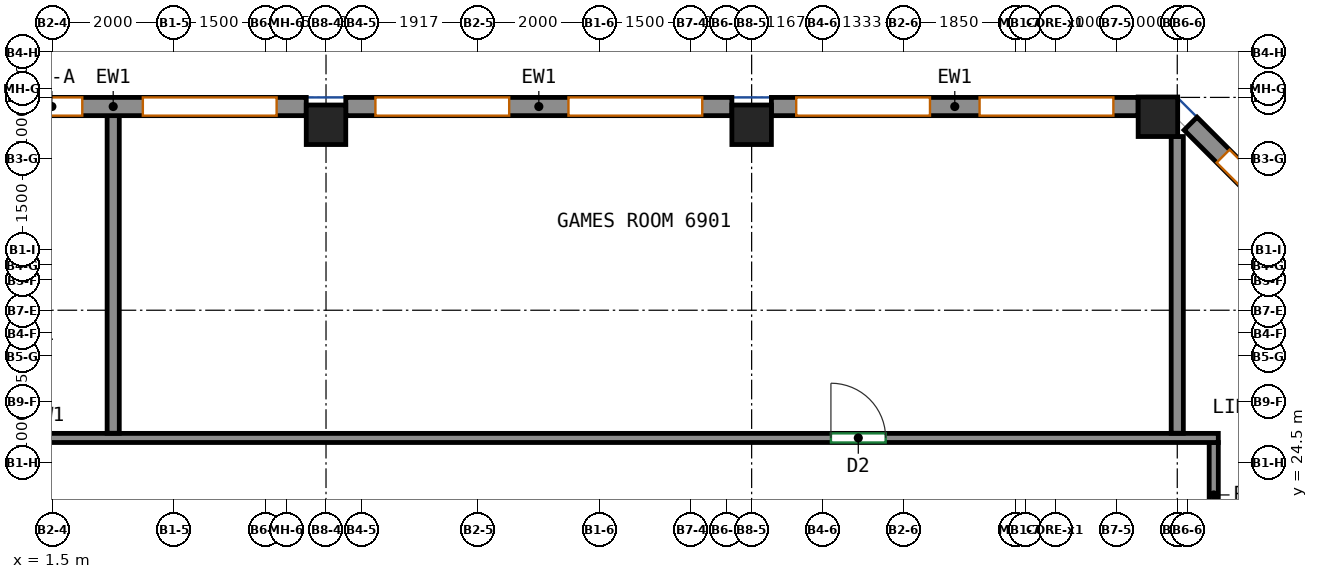
"""IFC4 building model, lengths in metres.
Left out: names, types, materials, properties, quantities, classifications, styles, units other than length and angle.
Written with IfcOpenShell. Run it as: python <this file> out.ifc"""

import sys

from ifc_helpers import new_model, si_unit, direction, frame, frame_2d, origin, origin_2d, place, context, subcontext, project, spatial, rectangle, extrude, source, transform, mapped, element, fill, save


model = new_model("IFC4")
c1 = context("Model", 3, precision=1e-05, world=origin(), true_north=direction((0.0, 1.0)))
c2 = subcontext(c1, "Body", "Model", "MODEL_VIEW")
j1 = project(units=[si_unit("LENGTHUNIT", "METRE"), si_unit("PLANEANGLEUNIT", "RADIAN")], contexts=[c1])
p1 = place(None, origin())
s1 = spatial("IfcSite", under=j1, at=p1, CompositionType="ELEMENT")
p2 = place(p1, origin())
s2 = spatial("IfcBuilding", under=s1, at=p2, CompositionType="ELEMENT")
p3 = place(p2, frame((0.0, 0.0, 280.6)))
s3 = spatial("IfcBuildingStorey", under=s2, at=p3, CompositionType="ELEMENT", Elevation=280.6)
m1 = source(origin(), c2, "Body", "SweptSolid", [
    extrude(rectangle(XDim=0.65, YDim=0.65, at=origin_2d()), origin(), (0.0, 0.0, 1.0), 3.12),
])
for number, where, z_axis, x_axis in (
    (1, (6.0, 30.05, 0.0), (0.0, 0.0, 1.0), (1.0, 0.0, 0.0)),
    (2, (13.0, 30.05, 0.0), (0.0, 0.0, 1.0), (1.0, 0.0, 0.0)),
    (3, (19.682, 30.182, 0.0), (0.0, 0.0, 1.0), (1.0, 0.0, 0.0)),
):
    element("IfcColumn", number, at=place(p3, frame(where, z_axis=z_axis, x_axis=x_axis)), inside=s3, PredefinedType="COLUMN", context=c2, shape_type="MappedRepresentation", body=[
        mapped(m1, transform((0.0, 0.0, 0.0))),
    ])
m2 = source(origin(), c2, "Body", "SweptSolid", [
    extrude(rectangle(XDim=3.712, YDim=0.3, at=frame_2d((1.856, 0.0))), origin(), (0.0, 0.0, 1.0), 3.12),
])
p4 = place(p3, frame((22.844, 27.444, 0.0), z_axis=(0.0, 0.0, 1.0), x_axis=(-0.707106781187, 0.707106781187, 0.0)))
e4 = element("IfcWall", 4, at=p4, inside=s3, PredefinedType="SOLIDWALL", context=c2, shape_type="MappedRepresentation", body=[
    mapped(m2, transform((0.0, 0.0, 0.0))),
])
p5 = place(p4, frame((0.756, 0.0, 0.8)))
e5 = element("IfcOpeningElement", 5, at=p5, cuts=e4, PredefinedType="OPENING", context=c2, shape_type="SweptSolid", body=[
    extrude(rectangle(XDim=2.2, YDim=2.05, at=frame_2d((1.1, 1.025))), frame((0.0, 0.16, 0.0), z_axis=(0.0, -1.0, 0.0), x_axis=(1.0, 0.0, 0.0)), (0.0, 0.0, 1.0), 0.32),
])
m3 = source(origin(), c2, "Body", "SweptSolid", [
    extrude(rectangle(XDim=6.032, YDim=0.3, at=frame_2d((3.016, 0.0))), origin(), (0.0, 0.0, 1.0), 3.12),
])
p6 = place(p3, frame((19.357, 30.35, 0.0), z_axis=(0.0, 0.0, 1.0), x_axis=(-1.0, 0.0, 0.0)))
e6 = element("IfcWall", 6, at=p6, inside=s3, PredefinedType="SOLIDWALL", context=c2, shape_type="MappedRepresentation", body=[
    mapped(m3, transform((0.0, 0.0, 0.0))),
])
p7 = place(p6, frame((0.408, 0.0, 0.8)))
e7 = element("IfcOpeningElement", 7, at=p7, cuts=e6, PredefinedType="OPENING", context=c2, shape_type="SweptSolid", body=[
    extrude(rectangle(XDim=2.2, YDim=2.05, at=frame_2d((1.1, 1.025))), frame((0.0, 0.16, 0.0), z_axis=(0.0, -1.0, 0.0), x_axis=(1.0, 0.0, 0.0)), (0.0, 0.0, 1.0), 0.32),
])
p8 = place(p6, frame((3.424, 0.0, 0.8)))
e8 = element("IfcOpeningElement", 8, at=p8, cuts=e6, PredefinedType="OPENING", context=c2, shape_type="SweptSolid", body=[
    extrude(rectangle(XDim=2.2, YDim=2.05, at=frame_2d((1.1, 1.025))), frame((0.0, 0.16, 0.0), z_axis=(0.0, -1.0, 0.0), x_axis=(1.0, 0.0, 0.0)), (0.0, 0.0, 1.0), 0.32),
])
m4 = source(origin(), c2, "Body", "SweptSolid", [
    extrude(rectangle(XDim=6.35, YDim=0.3, at=frame_2d((3.175, 0.0))), origin(), (0.0, 0.0, 1.0), 3.12),
])
p9 = place(p3, frame((12.675, 30.35, 0.0), z_axis=(0.0, 0.0, 1.0), x_axis=(-1.0, 0.0, 0.0)))
e9 = element("IfcWall", 9, at=p9, inside=s3, PredefinedType="SOLIDWALL", context=c2, shape_type="MappedRepresentation", body=[
    mapped(m4, transform((0.0, 0.0, 0.0))),
])
p10 = place(p9, frame((0.488, 0.0, 0.8)))
e10 = element("IfcOpeningElement", 10, at=p10, cuts=e9, PredefinedType="OPENING", context=c2, shape_type="SweptSolid", body=[
    extrude(rectangle(XDim=2.2, YDim=2.05, at=frame_2d((1.1, 1.025))), frame((0.0, 0.16, 0.0), z_axis=(0.0, -1.0, 0.0), x_axis=(1.0, 0.0, 0.0)), (0.0, 0.0, 1.0), 0.32),
])
p11 = place(p9, frame((3.663, 0.0, 0.8)))
e11 = element("IfcOpeningElement", 11, at=p11, cuts=e9, PredefinedType="OPENING", context=c2, shape_type="SweptSolid", body=[
    extrude(rectangle(XDim=2.2, YDim=2.05, at=frame_2d((1.1, 1.025))), frame((0.0, 0.16, 0.0), z_axis=(0.0, -1.0, 0.0), x_axis=(1.0, 0.0, 0.0)), (0.0, 0.0, 1.0), 0.32),
])
p12 = place(p3, frame((5.675, 30.35, 0.0), z_axis=(0.0, 0.0, 1.0), x_axis=(-1.0, 0.0, 0.0)))
e12 = element("IfcWall", 12, at=p12, inside=s3, PredefinedType="SOLIDWALL", context=c2, shape_type="MappedRepresentation", body=[
    mapped(m4, transform((0.0, 0.0, 0.0))),
])
p13 = place(p12, frame((0.488, 0.0, 0.8)))
e13 = element("IfcOpeningElement", 13, at=p13, cuts=e12, PredefinedType="OPENING", context=c2, shape_type="SweptSolid", body=[
    extrude(rectangle(XDim=2.2, YDim=2.05, at=frame_2d((1.1, 1.025))), frame((0.0, 0.16, 0.0), z_axis=(0.0, -1.0, 0.0), x_axis=(1.0, 0.0, 0.0)), (0.0, 0.0, 1.0), 0.32),
])
p14 = place(p12, frame((3.684, 0.0, 0.8)))
e14 = element("IfcOpeningElement", 14, at=p14, cuts=e12, PredefinedType="OPENING", context=c2, shape_type="SweptSolid", body=[
    extrude(rectangle(XDim=1.0, YDim=2.05, at=frame_2d((0.5, 1.025))), frame((0.0, 0.16, 0.0), z_axis=(0.0, -1.0, 0.0), x_axis=(1.0, 0.0, 0.0)), (0.0, 0.0, 1.0), 0.32),
])
p15 = place(p12, frame((5.009, 0.0, 0.8)))
e15 = element("IfcOpeningElement", 15, at=p15, cuts=e12, PredefinedType="OPENING", context=c2, shape_type="SweptSolid", body=[
    extrude(rectangle(XDim=0.85, YDim=2.05, at=frame_2d((0.425, 1.025))), frame((0.0, 0.16, 0.0), z_axis=(0.0, -1.0, 0.0), x_axis=(1.0, 0.0, 0.0)), (0.0, 0.0, 1.0), 0.32),
])
p16 = place(p3, frame((20.6, 23.1, 0.0), z_axis=(0.0, 0.0, 1.0), x_axis=(0.0, 1.0, 0.0)))
e16 = element("IfcWall", 16, at=p16, inside=s3, PredefinedType="PARTITIONING", context=c2, shape_type="SweptSolid", body=[
    extrude(rectangle(XDim=1.725, YDim=0.15, at=frame_2d((0.862, 0.0))), origin(), (0.0, 0.0, 1.0), 3.12),
])
p17 = place(p3, frame((-19.075, 24.9, 0.0), z_axis=(0.0, 0.0, 1.0), x_axis=(1.0, 0.0, 0.0)))
e17 = element("IfcWall", 17, at=p17, inside=s3, PredefinedType="PARTITIONING", context=c2, shape_type="SweptSolid", body=[
    extrude(rectangle(XDim=39.75, YDim=0.15, at=frame_2d((19.875, 0.0))), origin(), (0.0, 0.0, 1.0), 3.12),
])
p18 = place(p17, frame((11.365, 0.0, 0.0)))
e18 = element("IfcOpeningElement", 18, at=p18, cuts=e17, PredefinedType="OPENING", context=c2, shape_type="SweptSolid", body=[
    extrude(rectangle(XDim=1.0, YDim=2.1, at=frame_2d((0.5, 1.05))), frame((0.0, 0.085, 0.0), z_axis=(0.0, -1.0, 0.0), x_axis=(1.0, 0.0, 0.0)), (0.0, 0.0, 1.0), 0.17),
])
p19 = place(p17, frame((33.379, 0.0, 0.0)))
e19 = element("IfcOpeningElement", 19, at=p19, cuts=e17, PredefinedType="OPENING", context=c2, shape_type="SweptSolid", body=[
    extrude(rectangle(XDim=0.9, YDim=2.1, at=frame_2d((0.45, 1.05))), frame((0.0, 0.085, 0.0), z_axis=(0.0, -1.0, 0.0), x_axis=(1.0, 0.0, 0.0)), (0.0, 0.0, 1.0), 0.17),
])
p20 = place(p3, frame((20.0, 29.857, 0.0), z_axis=(0.0, 0.0, 1.0), x_axis=(0.0, -1.0, 0.0)))
e20 = element("IfcWall", 20, at=p20, inside=s3, PredefinedType="PARTITIONING", context=c2, shape_type="SweptSolid", body=[
    extrude(rectangle(XDim=4.88, YDim=0.2, at=frame_2d((2.44, 0.0))), origin(), (0.0, 0.0, 1.0), 3.12),
])
p21 = place(p3, frame((2.5, 30.25, 0.0), z_axis=(0.0, 0.0, 1.0), x_axis=(0.0, -1.0, 0.0)))
e21 = element("IfcWall", 21, at=p21, inside=s3, PredefinedType="PARTITIONING", context=c2, shape_type="SweptSolid", body=[
    extrude(rectangle(XDim=5.273, YDim=0.2, at=frame_2d((2.636, 0.0))), origin(), (0.0, 0.0, 1.0), 3.12),
])
p22 = place(p5, origin())
e22 = element("IfcWindow", 22, at=p22, inside=s3, PartitioningType="SINGLE_PANEL", PredefinedType="WINDOW", context=c2, shape_type="SweptSolid", body=[
    extrude(rectangle(XDim=2.2, YDim=2.05, at=frame_2d((1.1, 1.025))), frame((0.0, 0.03, 0.0), z_axis=(0.0, -1.0, 0.0), x_axis=(1.0, 0.0, 0.0)), (0.0, 0.0, 1.0), 0.06),
])
fill(e5, e22)
p23 = place(p7, origin())
e23 = element("IfcWindow", 23, at=p23, inside=s3, PartitioningType="SINGLE_PANEL", PredefinedType="WINDOW", context=c2, shape_type="SweptSolid", body=[
    extrude(rectangle(XDim=2.2, YDim=2.05, at=frame_2d((1.1, 1.025))), frame((0.0, 0.03, 0.0), z_axis=(0.0, -1.0, 0.0), x_axis=(1.0, 0.0, 0.0)), (0.0, 0.0, 1.0), 0.06),
])
fill(e7, e23)
p24 = place(p8, origin())
e24 = element("IfcWindow", 24, at=p24, inside=s3, PartitioningType="SINGLE_PANEL", PredefinedType="WINDOW", context=c2, shape_type="SweptSolid", body=[
    extrude(rectangle(XDim=2.2, YDim=2.05, at=frame_2d((1.1, 1.025))), frame((0.0, 0.03, 0.0), z_axis=(0.0, -1.0, 0.0), x_axis=(1.0, 0.0, 0.0)), (0.0, 0.0, 1.0), 0.06),
])
fill(e8, e24)
p25 = place(p10, origin())
e25 = element("IfcWindow", 25, at=p25, inside=s3, PartitioningType="SINGLE_PANEL", PredefinedType="WINDOW", context=c2, shape_type="SweptSolid", body=[
    extrude(rectangle(XDim=2.2, YDim=2.05, at=frame_2d((1.1, 1.025))), frame((0.0, 0.03, 0.0), z_axis=(0.0, -1.0, 0.0), x_axis=(1.0, 0.0, 0.0)), (0.0, 0.0, 1.0), 0.06),
])
fill(e10, e25)
p26 = place(p11, origin())
e26 = element("IfcWindow", 26, at=p26, inside=s3, PartitioningType="SINGLE_PANEL", PredefinedType="WINDOW", context=c2, shape_type="SweptSolid", body=[
    extrude(rectangle(XDim=2.2, YDim=2.05, at=frame_2d((1.1, 1.025))), frame((0.0, 0.03, 0.0), z_axis=(0.0, -1.0, 0.0), x_axis=(1.0, 0.0, 0.0)), (0.0, 0.0, 1.0), 0.06),
])
fill(e11, e26)
p27 = place(p13, origin())
e27 = element("IfcWindow", 27, at=p27, inside=s3, PartitioningType="SINGLE_PANEL", PredefinedType="WINDOW", context=c2, shape_type="SweptSolid", body=[
    extrude(rectangle(XDim=2.2, YDim=2.05, at=frame_2d((1.1, 1.025))), frame((0.0, 0.03, 0.0), z_axis=(0.0, -1.0, 0.0), x_axis=(1.0, 0.0, 0.0)), (0.0, 0.0, 1.0), 0.06),
])
fill(e13, e27)
p28 = place(p14, origin())
e28 = element("IfcWindow", 28, at=p28, inside=s3, PartitioningType="SINGLE_PANEL", PredefinedType="WINDOW", context=c2, shape_type="SweptSolid", body=[
    extrude(rectangle(XDim=1.0, YDim=2.05, at=frame_2d((0.5, 1.025))), frame((0.0, 0.03, 0.0), z_axis=(0.0, -1.0, 0.0), x_axis=(1.0, 0.0, 0.0)), (0.0, 0.0, 1.0), 0.06),
])
fill(e14, e28)
p29 = place(p19, origin())
e29 = element("IfcDoor", 29, at=p29, inside=s3, OperationType="SINGLE_SWING_LEFT", PredefinedType="DOOR", context=c2, shape_type="SweptSolid", body=[
    extrude(rectangle(XDim=0.9, YDim=2.1, at=frame_2d((0.45, 1.05))), frame((0.0, 0.025, 0.0), z_axis=(0.0, -1.0, 0.0), x_axis=(1.0, 0.0, 0.0)), (0.0, 0.0, 1.0), 0.05),
])
fill(e19, e29)
save(model, sys.argv[1])
